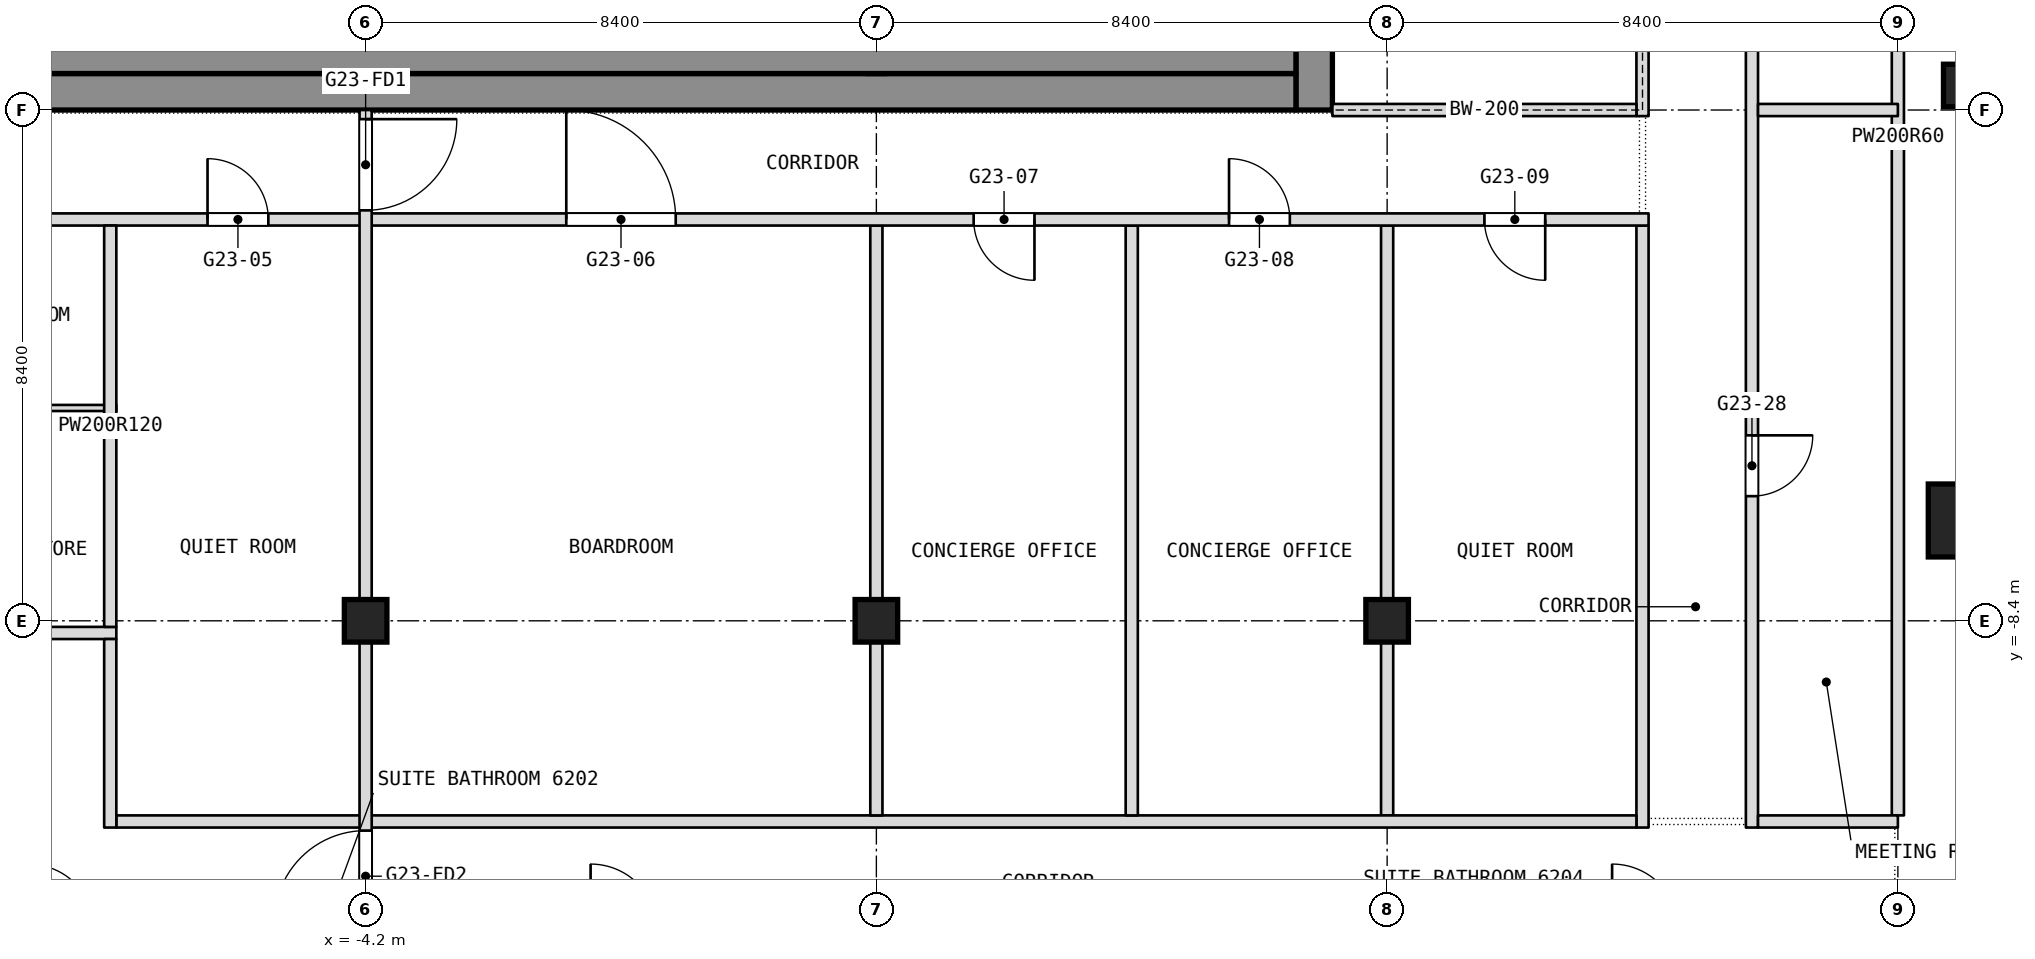
"""IFC4 building model, lengths in metres.
Left out: names, types, materials, properties, quantities, classifications, styles, units other than length and angle.
Written with IfcOpenShell. Run it as: python <this file> out.ifc"""

import sys

from ifc_helpers import new_model, si_unit, direction, frame, frame_2d, origin, origin_2d, place, context, subcontext, project, spatial, rectangle, extrude, element, fill, save


model = new_model("IFC4")
c1 = context("Model", 3, precision=1e-05, world=origin(), true_north=direction((0.0, 1.0)))
c2 = subcontext(c1, "Body", "Model", "MODEL_VIEW")
j1 = project(units=[si_unit("LENGTHUNIT", "METRE"), si_unit("PLANEANGLEUNIT", "RADIAN")], contexts=[c1])
p1 = place(None, origin())
s1 = spatial("IfcSite", under=j1, at=p1, CompositionType="ELEMENT")
p2 = place(p1, origin())
s2 = spatial("IfcBuilding", under=s1, at=p2, CompositionType="ELEMENT")
p3 = place(p2, frame((0.0, 0.0, 270.5)))
s3 = spatial("IfcBuildingStorey", under=s2, at=p3, CompositionType="ELEMENT", Elevation=270.5)
p4 = place(p3, frame((11.4, 0.0, 0.0), z_axis=(0.0, 0.0, 1.0), x_axis=(0.0, 1.0, 0.0)))
e1 = element("IfcWall", 1, at=p4, inside=s3, PredefinedType="SHEAR", context=c2, shape_type="SweptSolid", body=[
    extrude(rectangle(XDim=16.8, YDim=0.6, at=frame_2d((8.4, 0.0))), origin(), (0.0, 0.0, 1.0), 3.6),
])
p5 = place(p4, frame((2.3, 0.0, 0.0)))
e2 = element("IfcOpeningElement", 2, at=p5, cuts=e1, PredefinedType="OPENING", context=c2, shape_type="SweptSolid", body=[
    extrude(rectangle(XDim=1.1, YDim=2.1, at=frame_2d((0.55, 1.05))), frame((0.0, 0.3, 0.0), z_axis=(0.0, -1.0, 0.0), x_axis=(1.0, 0.0, 0.0)), (0.0, 0.0, 1.0), 0.6),
])
p6 = place(p4, frame((4.85, 0.0, 0.0)))
e3 = element("IfcOpeningElement", 3, at=p6, cuts=e1, PredefinedType="OPENING", context=c2, shape_type="SweptSolid", body=[
    extrude(rectangle(XDim=1.1, YDim=2.1, at=frame_2d((0.55, 1.05))), frame((0.0, 0.3, 0.0), z_axis=(0.0, -1.0, 0.0), x_axis=(1.0, 0.0, 0.0)), (0.0, 0.0, 1.0), 0.6),
])
p7 = place(p4, frame((6.825, 0.0, 0.0)))
e4 = element("IfcOpeningElement", 4, at=p7, cuts=e1, PredefinedType="OPENING", context=c2, shape_type="SweptSolid", body=[
    extrude(rectangle(XDim=1.2, YDim=2.1, at=frame_2d((0.6, 1.05))), frame((0.0, 0.3, 0.0), z_axis=(0.0, -1.0, 0.0), x_axis=(1.0, 0.0, 0.0)), (0.0, 0.0, 1.0), 0.6),
])
p8 = place(p4, frame((13.4, 0.0, 0.0)))
e5 = element("IfcOpeningElement", 5, at=p8, cuts=e1, PredefinedType="OPENING", context=c2, shape_type="SweptSolid", body=[
    extrude(rectangle(XDim=1.1, YDim=2.1, at=frame_2d((0.55, 1.05))), frame((0.0, 0.3, 0.0), z_axis=(0.0, -1.0, 0.0), x_axis=(1.0, 0.0, 0.0)), (0.0, 0.0, 1.0), 0.6),
])
p9 = place(p4, frame((10.85, 0.0, 0.0)))
e6 = element("IfcOpeningElement", 6, at=p9, cuts=e1, PredefinedType="OPENING", context=c2, shape_type="SweptSolid", body=[
    extrude(rectangle(XDim=1.1, YDim=2.1, at=frame_2d((0.55, 1.05))), frame((0.0, 0.3, 0.0), z_axis=(0.0, -1.0, 0.0), x_axis=(1.0, 0.0, 0.0)), (0.0, 0.0, 1.0), 0.6),
])
p10 = place(p4, frame((8.775, 0.0, 0.0)))
e7 = element("IfcOpeningElement", 7, at=p10, cuts=e1, PredefinedType="OPENING", context=c2, shape_type="SweptSolid", body=[
    extrude(rectangle(XDim=1.2, YDim=2.1, at=frame_2d((0.6, 1.05))), frame((0.0, 0.3, 0.0), z_axis=(0.0, -1.0, 0.0), x_axis=(1.0, 0.0, 0.0)), (0.0, 0.0, 1.0), 0.6),
])
p11 = place(p3, frame((-11.1, 0.3, 0.0), z_axis=(0.0, 0.0, 1.0), x_axis=(1.0, 0.0, 0.0)))
e8 = element("IfcWall", 8, at=p11, inside=s3, PredefinedType="SHEAR", context=c2, shape_type="SweptSolid", body=[
    extrude(rectangle(XDim=22.2, YDim=0.6, at=frame_2d((11.1, 0.0))), origin(), (0.0, 0.0, 1.0), 3.6),
])
p12 = place(p3, frame((-4.2, 0.6, 0.0), z_axis=(0.0, 0.0, 1.0), x_axis=(0.0, 1.0, 0.0)))
e9 = element("IfcWall", 9, at=p12, inside=s3, PredefinedType="SHEAR", context=c2, shape_type="SweptSolid", body=[
    extrude(rectangle(XDim=15.6, YDim=0.35, at=frame_2d((7.8, 0.0))), origin(), (0.0, 0.0, 1.0), 3.6),
])
p13 = place(p12, frame((8.7, 0.0, 0.0)))
e10 = element("IfcOpeningElement", 10, at=p13, cuts=e9, PredefinedType="OPENING", context=c2, shape_type="SweptSolid", body=[
    extrude(rectangle(XDim=1.2, YDim=2.1, at=frame_2d((0.6, 1.05))), frame((0.0, 0.175, 0.0), z_axis=(0.0, -1.0, 0.0), x_axis=(1.0, 0.0, 0.0)), (0.0, 0.0, 1.0), 0.35),
])
p14 = place(p3, frame((4.2, 0.6, 0.0), z_axis=(0.0, 0.0, 1.0), x_axis=(0.0, 1.0, 0.0)))
e11 = element("IfcWall", 11, at=p14, inside=s3, PredefinedType="SHEAR", context=c2, shape_type="SweptSolid", body=[
    extrude(rectangle(XDim=15.6, YDim=0.35, at=frame_2d((7.8, 0.0))), origin(), (0.0, 0.0, 1.0), 3.6),
])
p15 = place(p14, frame((6.15, 0.0, 0.0)))
e12 = element("IfcOpeningElement", 12, at=p15, cuts=e11, PredefinedType="OPENING", context=c2, shape_type="SweptSolid", body=[
    extrude(rectangle(XDim=1.2, YDim=2.1, at=frame_2d((0.6, 1.05))), frame((0.0, 0.175, 0.0), z_axis=(0.0, -1.0, 0.0), x_axis=(1.0, 0.0, 0.0)), (0.0, 0.0, 1.0), 0.35),
])
p16 = place(p3, frame((22.1, -6.75, 0.0), z_axis=(0.0, 0.0, 1.0), x_axis=(1.0, 0.0, 0.0)))
e13 = element("IfcColumn", 13, at=p16, inside=s3, PredefinedType="COLUMN", context=c2, shape_type="SweptSolid", body=[
    extrude(rectangle(XDim=1.2, YDim=1.2, at=origin_2d()), origin(), (0.0, 0.0, 1.0), 3.6),
])
for number, where, z_axis, x_axis in (
    (14, (-4.2, -8.4, 0.0), (0.0, 0.0, 1.0), (1.0, 0.0, 0.0)),
    (15, (4.2, -8.4, 0.0), (0.0, 0.0, 1.0), (1.0, 0.0, 0.0)),
    (16, (12.6, -8.4, 0.0), (0.0, 0.0, 1.0), (1.0, 0.0, 0.0)),
    (17, (22.1, 0.403, 0.0), (0.0, 0.0, 1.0), (1.0, 0.0, 0.0)),
):
    element("IfcColumn", number, at=place(p3, frame(where, z_axis=z_axis, x_axis=x_axis)), inside=s3, PredefinedType="COLUMN", context=c2, shape_type="SweptSolid", body=[
        extrude(rectangle(XDim=0.7, YDim=0.7, at=origin_2d()), origin(), (0.0, 0.0, 1.0), 3.6),
    ])
p17 = place(p3, frame((21.0, -11.6, 0.0), z_axis=(0.0, 0.0, 1.0), x_axis=(0.0, 1.0, 0.0)))
e18 = element("IfcWall", 18, at=p17, inside=s3, PredefinedType="PARTITIONING", context=c2, shape_type="SweptSolid", body=[
    extrude(rectangle(XDim=22.302, YDim=0.2, at=frame_2d((11.151, 0.0))), origin(), (0.0, 0.0, 1.0), 3.34),
])
p18 = place(p3, frame((18.6, -11.8, 0.0), z_axis=(0.0, 0.0, 1.0), x_axis=(0.0, 1.0, 0.0)))
e19 = element("IfcWall", 19, at=p18, inside=s3, PredefinedType="PARTITIONING", context=c2, shape_type="SweptSolid", body=[
    extrude(rectangle(XDim=27.336, YDim=0.2, at=frame_2d((13.668, 0.0))), origin(), (0.0, 0.0, 1.0), 3.34),
])
p19 = place(p18, frame((18.668, 0.0, 0.0)))
e20 = element("IfcOpeningElement", 20, at=p19, cuts=e19, PredefinedType="OPENING", context=c2, shape_type="SweptSolid", body=[
    extrude(rectangle(XDim=1.8, YDim=2.1, at=frame_2d((0.9, 1.05))), frame((0.0, 0.1, 0.0), z_axis=(0.0, -1.0, 0.0), x_axis=(1.0, 0.0, 0.0)), (0.0, 0.0, 1.0), 0.2),
])
p20 = place(p18, frame((5.45, 0.0, 0.0)))
e21 = element("IfcOpeningElement", 21, at=p20, cuts=e19, PredefinedType="OPENING", context=c2, shape_type="SweptSolid", body=[
    extrude(rectangle(XDim=1.0, YDim=2.1, at=frame_2d((0.5, 1.05))), frame((0.0, 0.1, 0.0), z_axis=(0.0, -1.0, 0.0), x_axis=(1.0, 0.0, 0.0)), (0.0, 0.0, 1.0), 0.2),
])
p21 = place(p3, frame((16.8, -11.8, 0.0), z_axis=(0.0, 0.0, 1.0), x_axis=(0.0, 1.0, 0.0)))
e22 = element("IfcWall", 22, at=p21, inside=s3, PredefinedType="PARTITIONING", context=c2, shape_type="SweptSolid", body=[
    extrude(rectangle(XDim=9.9, YDim=0.2, at=frame_2d((4.95, 0.0))), origin(), (0.0, 0.0, 1.0), 3.34),
])
p22 = place(p3, frame((12.6, -11.6, 0.0), z_axis=(0.0, 0.0, 1.0), x_axis=(0.0, 1.0, 0.0)))
e23 = element("IfcWall", 23, at=p22, inside=s3, PredefinedType="PARTITIONING", context=c2, shape_type="SweptSolid", body=[
    extrude(rectangle(XDim=9.7, YDim=0.2, at=frame_2d((4.85, 0.0))), origin(), (0.0, 0.0, 1.0), 3.34),
])
p23 = place(p3, frame((-8.3, -11.7, 0.0), z_axis=(0.0, 0.0, 1.0), x_axis=(1.0, 0.0, 0.0)))
e24 = element("IfcWall", 24, at=p23, inside=s3, PredefinedType="PARTITIONING", context=c2, shape_type="SweptSolid", body=[
    extrude(rectangle(XDim=25.0, YDim=0.2, at=frame_2d((12.5, 0.0))), origin(), (0.0, 0.0, 1.0), 3.34),
])
p24 = place(p3, frame((18.7, -11.7, 0.0), z_axis=(0.0, 0.0, 1.0), x_axis=(1.0, 0.0, 0.0)))
e25 = element("IfcWall", 25, at=p24, inside=s3, PredefinedType="PARTITIONING", context=c2, shape_type="SweptSolid", body=[
    extrude(rectangle(XDim=2.3, YDim=0.2, at=frame_2d((1.15, 0.0))), origin(), (0.0, 0.0, 1.0), 3.34),
])
p25 = place(p3, frame((-16.7, -8.6, 0.0), z_axis=(0.0, 0.0, 1.0), x_axis=(1.0, 0.0, 0.0)))
e26 = element("IfcWall", 26, at=p25, inside=s3, PredefinedType="PARTITIONING", context=c2, shape_type="SweptSolid", body=[
    extrude(rectangle(XDim=8.4, YDim=0.2, at=frame_2d((4.2, 0.0))), origin(), (0.0, 0.0, 1.0), 3.34),
])
p26 = place(p3, frame((8.4, -11.6, 0.0), z_axis=(0.0, 0.0, 1.0), x_axis=(0.0, 1.0, 0.0)))
e27 = element("IfcWall", 27, at=p26, inside=s3, PredefinedType="PARTITIONING", context=c2, shape_type="SweptSolid", body=[
    extrude(rectangle(XDim=9.7, YDim=0.2, at=frame_2d((4.85, 0.0))), origin(), (0.0, 0.0, 1.0), 3.34),
])
p27 = place(p3, frame((-12.5, -4.9, 0.0), z_axis=(0.0, 0.0, 1.0), x_axis=(1.0, 0.0, 0.0)))
e28 = element("IfcWall", 28, at=p27, inside=s3, PredefinedType="PARTITIONING", context=c2, shape_type="SweptSolid", body=[
    extrude(rectangle(XDim=4.2, YDim=0.1, at=frame_2d((2.1, 0.0))), origin(), (0.0, 0.0, 1.0), 3.34),
])
p28 = place(p27, frame((1.55, 0.0, 0.0)))
e29 = element("IfcOpeningElement", 29, at=p28, cuts=e28, PredefinedType="OPENING", context=c2, shape_type="SweptSolid", body=[
    extrude(rectangle(XDim=0.9, YDim=2.1, at=frame_2d((0.45, 1.05))), frame((0.0, 0.05, 0.0), z_axis=(0.0, -1.0, 0.0), x_axis=(1.0, 0.0, 0.0)), (0.0, 0.0, 1.0), 0.1),
])
p29 = place(p3, frame((4.2, -11.6, 0.0), z_axis=(0.0, 0.0, 1.0), x_axis=(0.0, 1.0, 0.0)))
e30 = element("IfcWall", 30, at=p29, inside=s3, PredefinedType="PARTITIONING", context=c2, shape_type="SweptSolid", body=[
    extrude(rectangle(XDim=9.7, YDim=0.2, at=frame_2d((4.85, 0.0))), origin(), (0.0, 0.0, 1.0), 3.34),
])
p30 = place(p3, frame((-16.9, -1.8, 0.0), z_axis=(0.0, 0.0, 1.0), x_axis=(1.0, 0.0, 0.0)))
e31 = element("IfcWall", 31, at=p30, inside=s3, PredefinedType="PARTITIONING", context=c2, shape_type="SweptSolid", body=[
    extrude(rectangle(XDim=33.8, YDim=0.2, at=frame_2d((16.9, 0.0))), origin(), (0.0, 0.0, 1.0), 3.34),
])
p31 = place(p30, frame((1.7, 0.0, 0.0)))
e32 = element("IfcOpeningElement", 32, at=p31, cuts=e31, PredefinedType="OPENING", context=c2, shape_type="SweptSolid", body=[
    extrude(rectangle(XDim=1.0, YDim=2.1, at=frame_2d((0.5, 1.05))), frame((0.0, 0.1, 0.0), z_axis=(0.0, -1.0, 0.0), x_axis=(1.0, 0.0, 0.0)), (0.0, 0.0, 1.0), 0.2),
])
p32 = place(p30, frame((5.9, 0.0, 0.0)))
e33 = element("IfcOpeningElement", 33, at=p32, cuts=e31, PredefinedType="OPENING", context=c2, shape_type="SweptSolid", body=[
    extrude(rectangle(XDim=1.0, YDim=2.1, at=frame_2d((0.5, 1.05))), frame((0.0, 0.1, 0.0), z_axis=(0.0, -1.0, 0.0), x_axis=(1.0, 0.0, 0.0)), (0.0, 0.0, 1.0), 0.2),
])
p33 = place(p30, frame((10.1, 0.0, 0.0)))
e34 = element("IfcOpeningElement", 34, at=p33, cuts=e31, PredefinedType="OPENING", context=c2, shape_type="SweptSolid", body=[
    extrude(rectangle(XDim=1.0, YDim=2.1, at=frame_2d((0.5, 1.05))), frame((0.0, 0.1, 0.0), z_axis=(0.0, -1.0, 0.0), x_axis=(1.0, 0.0, 0.0)), (0.0, 0.0, 1.0), 0.2),
])
p34 = place(p30, frame((16.0, 0.0, 0.0)))
e35 = element("IfcOpeningElement", 35, at=p34, cuts=e31, PredefinedType="OPENING", context=c2, shape_type="SweptSolid", body=[
    extrude(rectangle(XDim=1.8, YDim=2.1, at=frame_2d((0.9, 1.05))), frame((0.0, 0.1, 0.0), z_axis=(0.0, -1.0, 0.0), x_axis=(1.0, 0.0, 0.0)), (0.0, 0.0, 1.0), 0.2),
])
p35 = place(p30, frame((22.7, 0.0, 0.0)))
e36 = element("IfcOpeningElement", 36, at=p35, cuts=e31, PredefinedType="OPENING", context=c2, shape_type="SweptSolid", body=[
    extrude(rectangle(XDim=1.0, YDim=2.1, at=frame_2d((0.5, 1.05))), frame((0.0, 0.1, 0.0), z_axis=(0.0, -1.0, 0.0), x_axis=(1.0, 0.0, 0.0)), (0.0, 0.0, 1.0), 0.2),
])
p36 = place(p30, frame((26.9, 0.0, 0.0)))
e37 = element("IfcOpeningElement", 37, at=p36, cuts=e31, PredefinedType="OPENING", context=c2, shape_type="SweptSolid", body=[
    extrude(rectangle(XDim=1.0, YDim=2.1, at=frame_2d((0.5, 1.05))), frame((0.0, 0.1, 0.0), z_axis=(0.0, -1.0, 0.0), x_axis=(1.0, 0.0, 0.0)), (0.0, 0.0, 1.0), 0.2),
])
p37 = place(p30, frame((31.1, 0.0, 0.0)))
e38 = element("IfcOpeningElement", 38, at=p37, cuts=e31, PredefinedType="OPENING", context=c2, shape_type="SweptSolid", body=[
    extrude(rectangle(XDim=1.0, YDim=2.1, at=frame_2d((0.5, 1.05))), frame((0.0, 0.1, 0.0), z_axis=(0.0, -1.0, 0.0), x_axis=(1.0, 0.0, 0.0)), (0.0, 0.0, 1.0), 0.2),
])
p38 = place(p3, frame((18.7, 0.0, 0.0), z_axis=(0.0, 0.0, 1.0), x_axis=(1.0, 0.0, 0.0)))
e39 = element("IfcWall", 39, at=p38, inside=s3, PredefinedType="PARTITIONING", context=c2, shape_type="SweptSolid", body=[
    extrude(rectangle(XDim=2.3, YDim=0.2, at=frame_2d((1.15, 0.0))), origin(), (0.0, 0.0, 1.0), 3.0),
])
p39 = place(p3, frame((-4.2, -13.6, 0.0), z_axis=(0.0, 0.0, 1.0), x_axis=(0.0, 1.0, 0.0)))
e40 = element("IfcWall", 40, at=p39, inside=s3, PredefinedType="PARTITIONING", context=c2, shape_type="SweptSolid", body=[
    extrude(rectangle(XDim=13.6, YDim=0.2, at=frame_2d((6.8, 0.0))), origin(), (0.0, 0.0, 1.0), 3.34),
])
p40 = place(p39, frame((11.95, 0.0, 0.0)))
e41 = element("IfcOpeningElement", 41, at=p40, cuts=e40, PredefinedType="OPENING", context=c2, shape_type="SweptSolid", body=[
    extrude(rectangle(XDim=1.5, YDim=2.1, at=frame_2d((0.75, 1.05))), frame((0.0, 0.1, 0.0), z_axis=(0.0, -1.0, 0.0), x_axis=(1.0, 0.0, 0.0)), (0.0, 0.0, 1.0), 0.2),
])
p41 = place(p39, frame((0.25, 0.0, 0.0)))
e42 = element("IfcOpeningElement", 42, at=p41, cuts=e40, PredefinedType="OPENING", context=c2, shape_type="SweptSolid", body=[
    extrude(rectangle(XDim=1.5, YDim=2.1, at=frame_2d((0.75, 1.05))), frame((0.0, 0.1, 0.0), z_axis=(0.0, -1.0, 0.0), x_axis=(1.0, 0.0, 0.0)), (0.0, 0.0, 1.0), 0.2),
])
p42 = place(p3, frame((-8.4, -11.8, 0.0), z_axis=(0.0, 0.0, 1.0), x_axis=(0.0, 1.0, 0.0)))
e43 = element("IfcWall", 43, at=p42, inside=s3, PredefinedType="PARTITIONING", context=c2, shape_type="SweptSolid", body=[
    extrude(rectangle(XDim=3.1, YDim=0.2, at=frame_2d((1.55, 0.0))), origin(), (0.0, 0.0, 1.0), 3.34),
])
p43 = place(p3, frame((-8.4, -8.5, 0.0), z_axis=(0.0, 0.0, 1.0), x_axis=(0.0, 1.0, 0.0)))
e44 = element("IfcWall", 44, at=p43, inside=s3, PredefinedType="PARTITIONING", context=c2, shape_type="SweptSolid", body=[
    extrude(rectangle(XDim=6.6, YDim=0.2, at=frame_2d((3.3, 0.0))), origin(), (0.0, 0.0, 1.0), 3.34),
])
p44 = place(p3, frame((-11.1, 1.05, 0.0), z_axis=(0.0, 0.0, 1.0), x_axis=(1.0, 0.0, 0.0)))
e45 = element("IfcWall", 45, at=p44, inside=s3, PredefinedType="PARTITIONING", context=c2, shape_type="SweptSolid", body=[
    extrude(rectangle(XDim=22.2, YDim=0.9, at=frame_2d((11.1, 0.0))), origin(), (0.0, 0.0, 1.0), 3.34),
])
p45 = place(p3, frame((16.8, -0.1, 0.0), z_axis=(0.0, 0.0, 1.0), x_axis=(0.0, 1.0, 0.0)))
e46 = element("IfcWall", 46, at=p45, inside=s3, PredefinedType="PARTITIONING", context=c2, shape_type="SweptSolid", body=[
    extrude(rectangle(XDim=17.0, YDim=0.2, at=frame_2d((8.5, 0.0))), origin(), (0.0, 0.0, 1.0), 3.34),
])
p46 = place(p45, frame((2.2, 0.0, 0.0)))
e47 = element("IfcOpeningElement", 47, at=p46, cuts=e46, PredefinedType="OPENING", context=c2, shape_type="SweptSolid", body=[
    extrude(rectangle(XDim=1.8, YDim=2.1, at=frame_2d((0.9, 1.05))), frame((0.0, 0.1, 0.0), z_axis=(0.0, -1.0, 0.0), x_axis=(1.0, 0.0, 0.0)), (0.0, 0.0, 1.0), 0.2),
])
p47 = place(p45, frame((13.0, 0.0, 0.0)))
e48 = element("IfcOpeningElement", 48, at=p47, cuts=e46, PredefinedType="OPENING", context=c2, shape_type="SweptSolid", body=[
    extrude(rectangle(XDim=1.8, YDim=2.1, at=frame_2d((0.9, 1.05))), frame((0.0, 0.1, 0.0), z_axis=(0.0, -1.0, 0.0), x_axis=(1.0, 0.0, 0.0)), (0.0, 0.0, 1.0), 0.2),
])
p48 = place(p3, frame((11.7, 0.0, 0.0), z_axis=(0.0, 0.0, 1.0), x_axis=(1.0, 0.0, 0.0)))
e49 = element("IfcWall", 49, at=p48, inside=s3, PredefinedType="PARTITIONING", context=c2, shape_type="SweptSolid", body=[
    extrude(rectangle(XDim=5.0, YDim=0.2, at=frame_2d((2.5, 0.0))), origin(), (0.0, 0.0, 1.0), 3.0),
])
p49 = place(p20, origin())
e50 = element("IfcDoor", 50, at=p49, inside=s3, OperationType="SINGLE_SWING_LEFT", PredefinedType="DOOR", context=c2, shape_type="SweptSolid", body=[
    extrude(rectangle(XDim=1.0, YDim=2.1, at=frame_2d((0.5, 1.05))), frame((0.0, 0.025, 0.0), z_axis=(0.0, -1.0, 0.0), x_axis=(1.0, 0.0, 0.0)), (0.0, 0.0, 1.0), 0.05),
])
fill(e21, e50)
p50 = place(p33, origin())
e51 = element("IfcDoor", 51, at=p50, inside=s3, OperationType="SINGLE_SWING_RIGHT", PredefinedType="DOOR", context=c2, shape_type="SweptSolid", body=[
    extrude(rectangle(XDim=1.0, YDim=2.1, at=frame_2d((0.5, 1.05))), frame((0.0, 0.025, 0.0), z_axis=(0.0, -1.0, 0.0), x_axis=(1.0, 0.0, 0.0)), (0.0, 0.0, 1.0), 0.05),
])
fill(e34, e51)
p51 = place(p34, origin())
e52 = element("IfcDoor", 52, at=p51, inside=s3, OperationType="DOUBLE_DOOR_SINGLE_SWING", PredefinedType="DOOR", context=c2, shape_type="SweptSolid", body=[
    extrude(rectangle(XDim=1.8, YDim=2.1, at=frame_2d((0.9, 1.05))), frame((0.0, 0.025, 0.0), z_axis=(0.0, -1.0, 0.0), x_axis=(1.0, 0.0, 0.0)), (0.0, 0.0, 1.0), 0.05),
])
fill(e35, e52)
p52 = place(p35, origin())
e53 = element("IfcDoor", 53, at=p52, inside=s3, OperationType="SINGLE_SWING_RIGHT", PredefinedType="DOOR", context=c2, shape_type="SweptSolid", body=[
    extrude(rectangle(XDim=1.0, YDim=2.1, at=frame_2d((0.5, 1.05))), frame((0.0, 0.025, 0.0), z_axis=(0.0, -1.0, 0.0), x_axis=(1.0, 0.0, 0.0)), (0.0, 0.0, 1.0), 0.05),
])
fill(e36, e53)
p53 = place(p36, origin())
e54 = element("IfcDoor", 54, at=p53, inside=s3, OperationType="SINGLE_SWING_LEFT", PredefinedType="DOOR", context=c2, shape_type="SweptSolid", body=[
    extrude(rectangle(XDim=1.0, YDim=2.1, at=frame_2d((0.5, 1.05))), frame((0.0, 0.025, 0.0), z_axis=(0.0, -1.0, 0.0), x_axis=(1.0, 0.0, 0.0)), (0.0, 0.0, 1.0), 0.05),
])
fill(e37, e54)
p54 = place(p37, origin())
e55 = element("IfcDoor", 55, at=p54, inside=s3, OperationType="SINGLE_SWING_RIGHT", PredefinedType="DOOR", context=c2, shape_type="SweptSolid", body=[
    extrude(rectangle(XDim=1.0, YDim=2.1, at=frame_2d((0.5, 1.05))), frame((0.0, 0.025, 0.0), z_axis=(0.0, -1.0, 0.0), x_axis=(1.0, 0.0, 0.0)), (0.0, 0.0, 1.0), 0.05),
])
fill(e38, e55)
p55 = place(p40, origin())
e56 = element("IfcDoor", 56, at=p55, inside=s3, OperationType="DOUBLE_DOOR_DOUBLE_SWING", PredefinedType="DOOR", context=c2, shape_type="SweptSolid", body=[
    extrude(rectangle(XDim=1.5, YDim=2.1, at=frame_2d((0.75, 1.05))), frame((0.0, 0.025, 0.0), z_axis=(0.0, -1.0, 0.0), x_axis=(1.0, 0.0, 0.0)), (0.0, 0.0, 1.0), 0.05),
])
fill(e41, e56)
p56 = place(p41, origin())
e57 = element("IfcDoor", 57, at=p56, inside=s3, OperationType="DOUBLE_DOOR_DOUBLE_SWING", PredefinedType="DOOR", context=c2, shape_type="SweptSolid", body=[
    extrude(rectangle(XDim=1.5, YDim=2.1, at=frame_2d((0.75, 1.05))), frame((0.0, 0.025, 0.0), z_axis=(0.0, -1.0, 0.0), x_axis=(1.0, 0.0, 0.0)), (0.0, 0.0, 1.0), 0.05),
])
fill(e42, e57)
save(model, sys.argv[1])
